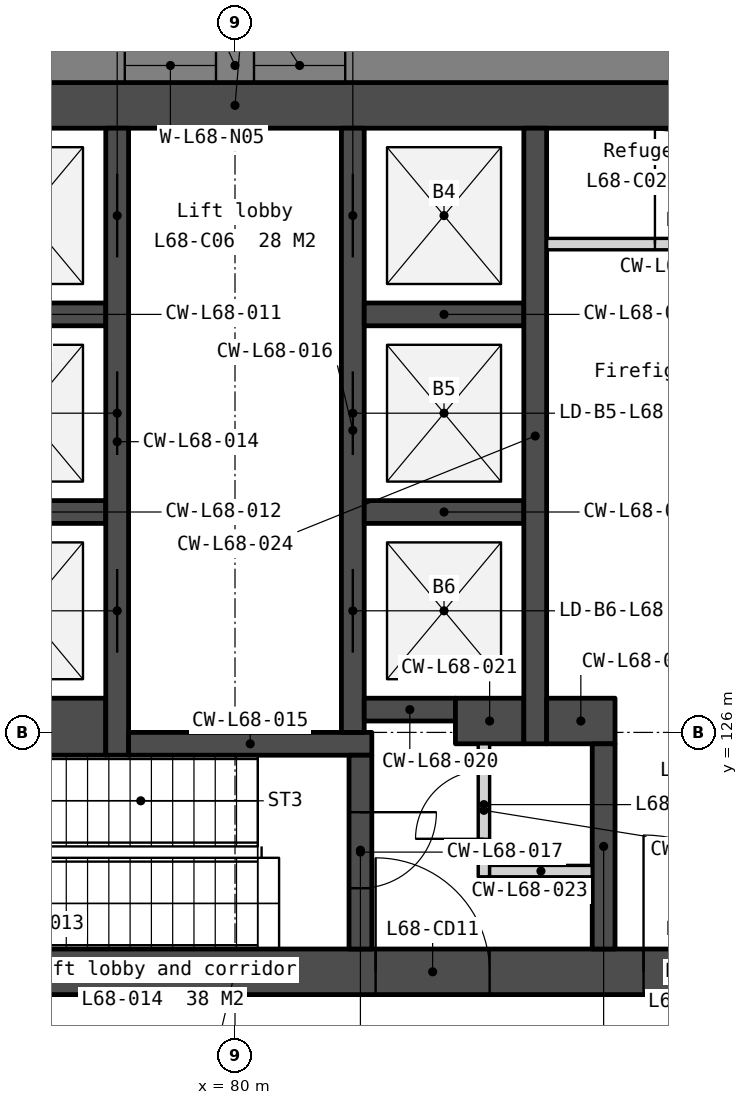
"""IFC4 building model, lengths in metres.
Left out: names, types, materials, properties, quantities, classifications, styles, units other than length and angle.
Written with IfcOpenShell. Run it as: python <this file> out.ifc"""

import sys

from ifc_helpers import new_model, si_unit, direction, frame, frame_2d, origin, place, context, subcontext, project, spatial, polyline, rectangle, outline, extrude, element, fill, save


model = new_model("IFC4")
c1 = context("Model", 3, precision=1e-05, world=origin(), true_north=direction((0.0, 1.0)))
c2 = subcontext(c1, "Body", "Model", "MODEL_VIEW")
j1 = project(units=[si_unit("LENGTHUNIT", "METRE"), si_unit("PLANEANGLEUNIT", "RADIAN")], contexts=[c1])
p1 = place(None, origin())
s1 = spatial("IfcSite", under=j1, at=p1, CompositionType="ELEMENT")
p2 = place(p1, origin())
s2 = spatial("IfcBuilding", under=s1, at=p2, CompositionType="ELEMENT")
p3 = place(p2, frame((0.0, 0.0, 277.7)))
s3 = spatial("IfcBuildingStorey", under=s2, at=p3, CompositionType="ELEMENT", Elevation=277.7)
p4 = place(p3, frame((69.0, 134.25, 0.0), z_axis=(0.0, 0.0, 1.0), x_axis=(1.0, 0.0, 0.0)))
e1 = element("IfcWall", 1, at=p4, inside=s3, PredefinedType="SOLIDWALL", context=c2, shape_type="SweptSolid", body=[
    extrude(rectangle(XDim=22.0, YDim=0.6, at=frame_2d((11.0, 0.0))), origin(), (0.0, 0.0, 1.0), 3.75),
])
p5 = place(p3, frame((69.0, 122.85, 0.0), z_axis=(0.0, 0.0, 1.0), x_axis=(1.0, 0.0, 0.0)))
e2 = element("IfcWall", 2, at=p5, inside=s3, PredefinedType="SOLIDWALL", context=c2, shape_type="SweptSolid", body=[
    extrude(rectangle(XDim=22.0, YDim=0.6, at=frame_2d((11.0, 0.0))), origin(), (0.0, 0.0, 1.0), 3.75),
])
p6 = place(p5, frame((16.375, 0.0, 0.0)))
e3 = element("IfcOpeningElement", 3, at=p6, cuts=e2, PredefinedType="OPENING", context=c2, shape_type="SweptSolid", body=[
    extrude(rectangle(XDim=1.8, YDim=2.1, at=frame_2d((0.9, 1.05))), frame((0.0, 0.31, 0.0), z_axis=(0.0, -1.0, 0.0), x_axis=(1.0, 0.0, 0.0)), (0.0, 0.0, 1.0), 0.62),
])
p7 = place(p5, frame((3.825, 0.0, 0.0)))
e4 = element("IfcOpeningElement", 4, at=p7, cuts=e2, PredefinedType="OPENING", context=c2, shape_type="SweptSolid", body=[
    extrude(rectangle(XDim=1.8, YDim=2.1, at=frame_2d((0.9, 1.05))), frame((0.0, 0.31, 0.0), z_axis=(0.0, -1.0, 0.0), x_axis=(1.0, 0.0, 0.0)), (0.0, 0.0, 1.0), 0.62),
])
p8 = place(p5, frame((12.85, 0.0, 0.0)))
e5 = element("IfcOpeningElement", 5, at=p8, cuts=e2, PredefinedType="OPENING", context=c2, shape_type="SweptSolid", body=[
    extrude(rectangle(XDim=1.5, YDim=2.1, at=frame_2d((0.75, 1.05))), frame((0.0, 0.31, 0.0), z_axis=(0.0, -1.0, 0.0), x_axis=(1.0, 0.0, 0.0)), (0.0, 0.0, 1.0), 0.62),
])
for number, where, z_axis, x_axis in (
    (6, (76.2, 131.5, 0.0), (0.0, 0.0, 1.0), (1.0, 0.0, 0.0)),
    (7, (76.2, 128.9, 0.0), (0.0, 0.0, 1.0), (1.0, 0.0, 0.0)),
):
    element("IfcWall", number, at=place(p3, frame(where, z_axis=z_axis, x_axis=x_axis)), inside=s3, PredefinedType="SOLIDWALL", context=c2, shape_type="SweptSolid", body=[
        extrude(rectangle(XDim=2.1, YDim=0.3, at=frame_2d((1.05, 0.0))), origin(), (0.0, 0.0, 1.0), 3.75),
    ])
p9 = place(p3, frame((76.2, 126.075, 0.0), z_axis=(0.0, 0.0, 1.0), x_axis=(1.0, 0.0, 0.0)))
e8 = element("IfcWall", 8, at=p9, inside=s3, PredefinedType="SOLIDWALL", context=c2, shape_type="SweptSolid", body=[
    extrude(rectangle(XDim=2.1, YDim=0.75, at=frame_2d((1.05, 0.0))), origin(), (0.0, 0.0, 1.0), 3.75),
])
p10 = place(p3, frame((78.45, 133.95, 0.0), z_axis=(0.0, 0.0, 1.0), x_axis=(0.0, -1.0, 0.0)))
e9 = element("IfcWall", 9, at=p10, inside=s3, PredefinedType="SOLIDWALL", context=c2, shape_type="SweptSolid", body=[
    extrude(rectangle(XDim=8.25, YDim=0.3, at=frame_2d((4.125, 0.0))), origin(), (0.0, 0.0, 1.0), 3.75),
])
p11 = place(p10, frame((0.6, 0.0, 0.0)))
e10 = element("IfcOpeningElement", 10, at=p11, cuts=e9, PredefinedType="OPENING", context=c2, shape_type="SweptSolid", body=[
    extrude(rectangle(XDim=1.1, YDim=2.1, at=frame_2d((0.55, 1.05))), frame((0.0, 0.16, 0.0), z_axis=(0.0, -1.0, 0.0), x_axis=(1.0, 0.0, 0.0)), (0.0, 0.0, 1.0), 0.32),
])
p12 = place(p10, frame((3.2, 0.0, 0.0)))
e11 = element("IfcOpeningElement", 11, at=p12, cuts=e9, PredefinedType="OPENING", context=c2, shape_type="SweptSolid", body=[
    extrude(rectangle(XDim=1.1, YDim=2.1, at=frame_2d((0.55, 1.05))), frame((0.0, 0.16, 0.0), z_axis=(0.0, -1.0, 0.0), x_axis=(1.0, 0.0, 0.0)), (0.0, 0.0, 1.0), 0.32),
])
p13 = place(p10, frame((5.8, 0.0, 0.0)))
e12 = element("IfcOpeningElement", 12, at=p13, cuts=e9, PredefinedType="OPENING", context=c2, shape_type="SweptSolid", body=[
    extrude(rectangle(XDim=1.1, YDim=2.1, at=frame_2d((0.55, 1.05))), frame((0.0, 0.16, 0.0), z_axis=(0.0, -1.0, 0.0), x_axis=(1.0, 0.0, 0.0)), (0.0, 0.0, 1.0), 0.32),
])
p14 = place(p3, frame((78.6, 125.85, 0.0), z_axis=(0.0, 0.0, 1.0), x_axis=(1.0, 0.0, 0.0)))
e13 = element("IfcWall", 13, at=p14, inside=s3, PredefinedType="SOLIDWALL", context=c2, shape_type="SweptSolid", body=[
    extrude(rectangle(XDim=3.2, YDim=0.3, at=frame_2d((1.6, 0.0))), origin(), (0.0, 0.0, 1.0), 3.75),
])
p15 = place(p3, frame((81.55, 133.95, 0.0), z_axis=(0.0, 0.0, 1.0), x_axis=(0.0, -1.0, 0.0)))
e14 = element("IfcWall", 14, at=p15, inside=s3, PredefinedType="SOLIDWALL", context=c2, shape_type="SweptSolid", body=[
    extrude(rectangle(XDim=7.95, YDim=0.3, at=frame_2d((3.975, 0.0))), origin(), (0.0, 0.0, 1.0), 3.75),
])
p16 = place(p15, frame((0.6, 0.0, 0.0)))
e15 = element("IfcOpeningElement", 15, at=p16, cuts=e14, PredefinedType="OPENING", context=c2, shape_type="SweptSolid", body=[
    extrude(rectangle(XDim=1.1, YDim=2.1, at=frame_2d((0.55, 1.05))), frame((0.0, 0.16, 0.0), z_axis=(0.0, -1.0, 0.0), x_axis=(1.0, 0.0, 0.0)), (0.0, 0.0, 1.0), 0.32),
])
p17 = place(p15, frame((3.2, 0.0, 0.0)))
e16 = element("IfcOpeningElement", 16, at=p17, cuts=e14, PredefinedType="OPENING", context=c2, shape_type="SweptSolid", body=[
    extrude(rectangle(XDim=1.1, YDim=2.1, at=frame_2d((0.55, 1.05))), frame((0.0, 0.16, 0.0), z_axis=(0.0, -1.0, 0.0), x_axis=(1.0, 0.0, 0.0)), (0.0, 0.0, 1.0), 0.32),
])
p18 = place(p15, frame((5.8, 0.0, 0.0)))
e17 = element("IfcOpeningElement", 17, at=p18, cuts=e14, PredefinedType="OPENING", context=c2, shape_type="SweptSolid", body=[
    extrude(rectangle(XDim=1.1, YDim=2.1, at=frame_2d((0.55, 1.05))), frame((0.0, 0.16, 0.0), z_axis=(0.0, -1.0, 0.0), x_axis=(1.0, 0.0, 0.0)), (0.0, 0.0, 1.0), 0.32),
])
p19 = place(p3, frame((81.65, 125.7, 0.0), z_axis=(0.0, 0.0, 1.0), x_axis=(0.0, -1.0, 0.0)))
e18 = element("IfcWall", 18, at=p19, inside=s3, PredefinedType="SOLIDWALL", context=c2, shape_type="SweptSolid", body=[
    extrude(rectangle(XDim=2.55, YDim=0.3, at=frame_2d((1.275, 0.0))), origin(), (0.0, 0.0, 1.0), 3.75),
])
p20 = place(p19, frame((0.75, 0.0, 0.0)))
e19 = element("IfcOpeningElement", 19, at=p20, cuts=e18, PredefinedType="OPENING", context=c2, shape_type="SweptSolid", body=[
    extrude(rectangle(XDim=1.0, YDim=2.1, at=frame_2d((0.5, 1.05))), frame((0.0, 0.16, 0.0), z_axis=(0.0, -1.0, 0.0), x_axis=(1.0, 0.0, 0.0)), (0.0, 0.0, 1.0), 0.32),
])
for number, where, z_axis, x_axis in (
    (20, (81.7, 131.5, 0.0), (0.0, 0.0, 1.0), (1.0, 0.0, 0.0)),
    (21, (81.7, 128.9, 0.0), (0.0, 0.0, 1.0), (1.0, 0.0, 0.0)),
):
    element("IfcWall", number, at=place(p3, frame(where, z_axis=z_axis, x_axis=x_axis)), inside=s3, PredefinedType="SOLIDWALL", context=c2, shape_type="SweptSolid", body=[
        extrude(rectangle(XDim=2.1, YDim=0.3, at=frame_2d((1.05, 0.0))), origin(), (0.0, 0.0, 1.0), 3.75),
    ])
p21 = place(p3, frame((81.7, 126.3, 0.0), z_axis=(0.0, 0.0, 1.0), x_axis=(1.0, 0.0, 0.0)))
e22 = element("IfcWall", 22, at=p21, inside=s3, PredefinedType="SOLIDWALL", context=c2, shape_type="SweptSolid", body=[
    extrude(rectangle(XDim=1.2, YDim=0.3, at=frame_2d((0.6, 0.0))), origin(), (0.0, 0.0, 1.0), 3.75),
])
p22 = place(p3, frame((82.9, 126.15, 0.0), z_axis=(0.0, 0.0, 1.0), x_axis=(1.0, 0.0, 0.0)))
e23 = element("IfcWall", 23, at=p22, inside=s3, PredefinedType="SOLIDWALL", context=c2, shape_type="SweptSolid", body=[
    extrude(rectangle(XDim=0.9, YDim=0.6, at=frame_2d((0.45, 0.0))), origin(), (0.0, 0.0, 1.0), 3.75),
])
p23 = place(p3, frame((83.275, 125.85, 0.0), z_axis=(0.0, 0.0, 1.0), x_axis=(0.0, -1.0, 0.0)))
e24 = element("IfcWall", 24, at=p23, inside=s3, PredefinedType="PARTITIONING", context=c2, shape_type="SweptSolid", body=[
    extrude(rectangle(XDim=1.75, YDim=0.15, at=frame_2d((0.875, 0.0))), origin(), (0.0, 0.0, 1.0), 3.75),
])
p24 = place(p23, frame((0.35, 0.0, 0.0)))
e25 = element("IfcOpeningElement", 25, at=p24, cuts=e24, PredefinedType="OPENING", context=c2, shape_type="SweptSolid", body=[
    extrude(rectangle(XDim=0.9, YDim=2.1, at=frame_2d((0.45, 1.05))), frame((0.0, 0.085, 0.0), z_axis=(0.0, -1.0, 0.0), x_axis=(1.0, 0.0, 0.0)), (0.0, 0.0, 1.0), 0.17),
])
p25 = place(p3, frame((83.35, 124.175, 0.0), z_axis=(0.0, 0.0, 1.0), x_axis=(1.0, 0.0, 0.0)))
e26 = element("IfcWall", 26, at=p25, inside=s3, PredefinedType="PARTITIONING", context=c2, shape_type="SweptSolid", body=[
    extrude(rectangle(XDim=1.35, YDim=0.15, at=frame_2d((0.675, 0.0))), origin(), (0.0, 0.0, 1.0), 3.75),
])
p26 = place(p3, frame((83.95, 133.95, 0.0), z_axis=(0.0, 0.0, 1.0), x_axis=(0.0, -1.0, 0.0)))
e27 = element("IfcWall", 27, at=p26, inside=s3, PredefinedType="SOLIDWALL", context=c2, shape_type="SweptSolid", body=[
    extrude(rectangle(XDim=8.1, YDim=0.3, at=frame_2d((4.05, 0.0))), origin(), (0.0, 0.0, 1.0), 3.75),
])
p27 = place(p3, frame((84.1, 132.425, 0.0), z_axis=(0.0, 0.0, 1.0), x_axis=(1.0, 0.0, 0.0)))
e28 = element("IfcWall", 28, at=p27, inside=s3, PredefinedType="PARTITIONING", context=c2, shape_type="SweptSolid", body=[
    extrude(rectangle(XDim=3.45, YDim=0.15, at=frame_2d((1.725, 0.0))), origin(), (0.0, 0.0, 1.0), 3.75),
])
p28 = place(p27, frame((1.425, 0.0, 0.0)))
e29 = element("IfcOpeningElement", 29, at=p28, cuts=e28, PredefinedType="OPENING", context=c2, shape_type="SweptSolid", body=[
    extrude(rectangle(XDim=1.5, YDim=2.1, at=frame_2d((0.75, 1.05))), frame((0.0, 0.085, 0.0), z_axis=(0.0, -1.0, 0.0), x_axis=(1.0, 0.0, 0.0)), (0.0, 0.0, 1.0), 0.17),
])
p29 = place(p3, frame((84.1, 126.15, 0.0), z_axis=(0.0, 0.0, 1.0), x_axis=(1.0, 0.0, 0.0)))
e30 = element("IfcWall", 30, at=p29, inside=s3, PredefinedType="SOLIDWALL", context=c2, shape_type="SweptSolid", body=[
    extrude(rectangle(XDim=0.9, YDim=0.6, at=frame_2d((0.45, 0.0))), origin(), (0.0, 0.0, 1.0), 3.75),
])
p30 = place(p3, frame((84.85, 125.85, 0.0), z_axis=(0.0, 0.0, 1.0), x_axis=(0.0, -1.0, 0.0)))
e31 = element("IfcWall", 31, at=p30, inside=s3, PredefinedType="SOLIDWALL", context=c2, shape_type="SweptSolid", body=[
    extrude(rectangle(XDim=2.7, YDim=0.3, at=frame_2d((1.35, 0.0))), origin(), (0.0, 0.0, 1.0), 3.75),
])
p31 = place(p3, frame((98.486, 134.775, -0.15), z_axis=(0.0, 0.0, 1.0), x_axis=(-1.0, 0.0, 0.0)))
e32 = element("IfcWall", 32, at=p31, inside=s3, PredefinedType="SOLIDWALL", context=c2, shape_type="SweptSolid", body=[
    extrude(outline(polyline([(36.972, 0.0), (36.972, 3.9), (0.0, 3.9), (0.0, 0.0), (36.972, 0.0)])), frame((0.0, 0.225, 0.0), z_axis=(0.0, -1.0, 0.0), x_axis=(1.0, 0.0, 0.0)), (0.0, 0.0, 1.0), 0.45),
])
p32 = place(p31, frame((0.744, 0.0, 0.95)))
e33 = element("IfcOpeningElement", 33, at=p32, cuts=e32, PredefinedType="OPENING", context=c2, shape_type="SweptSolid", body=[
    extrude(rectangle(XDim=1.2, YDim=2.2, at=frame_2d((0.6, 1.1))), frame((0.0, 0.235, 0.0), z_axis=(0.0, -1.0, 0.0), x_axis=(1.0, 0.0, 0.0)), (0.0, 0.0, 1.0), 0.47),
])
p33 = place(p31, frame((7.793, 0.0, 0.95)))
e34 = element("IfcOpeningElement", 34, at=p33, cuts=e32, PredefinedType="OPENING", context=c2, shape_type="SweptSolid", body=[
    extrude(rectangle(XDim=1.2, YDim=2.2, at=frame_2d((0.6, 1.1))), frame((0.0, 0.235, 0.0), z_axis=(0.0, -1.0, 0.0), x_axis=(1.0, 0.0, 0.0)), (0.0, 0.0, 1.0), 0.47),
])
p34 = place(p31, frame((9.493, 0.0, 0.95)))
e35 = element("IfcOpeningElement", 35, at=p34, cuts=e32, PredefinedType="OPENING", context=c2, shape_type="SweptSolid", body=[
    extrude(rectangle(XDim=1.2, YDim=2.2, at=frame_2d((0.6, 1.1))), frame((0.0, 0.235, 0.0), z_axis=(0.0, -1.0, 0.0), x_axis=(1.0, 0.0, 0.0)), (0.0, 0.0, 1.0), 0.47),
])
p35 = place(p31, frame((17.036, 0.0, 0.95)))
e36 = element("IfcOpeningElement", 36, at=p35, cuts=e32, PredefinedType="OPENING", context=c2, shape_type="SweptSolid", body=[
    extrude(rectangle(XDim=1.2, YDim=2.2, at=frame_2d((0.6, 1.1))), frame((0.0, 0.235, 0.0), z_axis=(0.0, -1.0, 0.0), x_axis=(1.0, 0.0, 0.0)), (0.0, 0.0, 1.0), 0.47),
])
p36 = place(p31, frame((18.736, 0.0, 0.95)))
e37 = element("IfcOpeningElement", 37, at=p36, cuts=e32, PredefinedType="OPENING", context=c2, shape_type="SweptSolid", body=[
    extrude(rectangle(XDim=1.2, YDim=2.2, at=frame_2d((0.6, 1.1))), frame((0.0, 0.235, 0.0), z_axis=(0.0, -1.0, 0.0), x_axis=(1.0, 0.0, 0.0)), (0.0, 0.0, 1.0), 0.47),
])
p37 = place(p31, frame((26.279, 0.0, 0.95)))
e38 = element("IfcOpeningElement", 38, at=p37, cuts=e32, PredefinedType="OPENING", context=c2, shape_type="SweptSolid", body=[
    extrude(rectangle(XDim=1.2, YDim=2.2, at=frame_2d((0.6, 1.1))), frame((0.0, 0.235, 0.0), z_axis=(0.0, -1.0, 0.0), x_axis=(1.0, 0.0, 0.0)), (0.0, 0.0, 1.0), 0.47),
])
p38 = place(p31, frame((27.979, 0.0, 0.95)))
e39 = element("IfcOpeningElement", 39, at=p38, cuts=e32, PredefinedType="OPENING", context=c2, shape_type="SweptSolid", body=[
    extrude(rectangle(XDim=1.2, YDim=2.2, at=frame_2d((0.6, 1.1))), frame((0.0, 0.235, 0.0), z_axis=(0.0, -1.0, 0.0), x_axis=(1.0, 0.0, 0.0)), (0.0, 0.0, 1.0), 0.47),
])
p39 = place(p31, frame((35.028, 0.0, 0.95)))
e40 = element("IfcOpeningElement", 40, at=p39, cuts=e32, PredefinedType="OPENING", context=c2, shape_type="SweptSolid", body=[
    extrude(rectangle(XDim=1.2, YDim=2.2, at=frame_2d((0.6, 1.1))), frame((0.0, 0.235, 0.0), z_axis=(0.0, -1.0, 0.0), x_axis=(1.0, 0.0, 0.0)), (0.0, 0.0, 1.0), 0.47),
])
p40 = place(p3, frame((60.609, 133.207, -0.15), z_axis=(0.0, 0.0, 1.0), x_axis=(0.500002536638, -0.866023939251, 0.0)))
e41 = element("IfcWall", 41, at=p40, inside=s3, PredefinedType="SOLIDWALL", context=c2, shape_type="SweptSolid", body=[
    extrude(outline(polyline([(36.972, 0.0), (36.972, 3.9), (0.0, 3.9), (0.0, 0.0), (36.972, 0.0)])), frame((0.0, 0.225, 0.0), z_axis=(0.0, -1.0, 0.0), x_axis=(1.0, 0.0, 0.0)), (0.0, 0.0, 1.0), 0.45),
])
p41 = place(p40, frame((0.744, 0.0, 0.95)))
e42 = element("IfcOpeningElement", 42, at=p41, cuts=e41, PredefinedType="OPENING", context=c2, shape_type="SweptSolid", body=[
    extrude(rectangle(XDim=1.2, YDim=2.2, at=frame_2d((0.6, 1.1))), frame((0.0, 0.235, 0.0), z_axis=(0.0, -1.0, 0.0), x_axis=(1.0, 0.0, 0.0)), (0.0, 0.0, 1.0), 0.47),
])
p42 = place(p40, frame((7.793, 0.0, 0.95)))
e43 = element("IfcOpeningElement", 43, at=p42, cuts=e41, PredefinedType="OPENING", context=c2, shape_type="SweptSolid", body=[
    extrude(rectangle(XDim=1.2, YDim=2.2, at=frame_2d((0.6, 1.1))), frame((0.0, 0.235, 0.0), z_axis=(0.0, -1.0, 0.0), x_axis=(1.0, 0.0, 0.0)), (0.0, 0.0, 1.0), 0.47),
])
p43 = place(p40, frame((9.493, 0.0, 0.95)))
e44 = element("IfcOpeningElement", 44, at=p43, cuts=e41, PredefinedType="OPENING", context=c2, shape_type="SweptSolid", body=[
    extrude(rectangle(XDim=1.2, YDim=2.2, at=frame_2d((0.6, 1.1))), frame((0.0, 0.235, 0.0), z_axis=(0.0, -1.0, 0.0), x_axis=(1.0, 0.0, 0.0)), (0.0, 0.0, 1.0), 0.47),
])
p44 = place(p40, frame((17.036, 0.0, 0.95)))
e45 = element("IfcOpeningElement", 45, at=p44, cuts=e41, PredefinedType="OPENING", context=c2, shape_type="SweptSolid", body=[
    extrude(rectangle(XDim=1.2, YDim=2.2, at=frame_2d((0.6, 1.1))), frame((0.0, 0.235, 0.0), z_axis=(0.0, -1.0, 0.0), x_axis=(1.0, 0.0, 0.0)), (0.0, 0.0, 1.0), 0.47),
])
p45 = place(p40, frame((18.736, 0.0, 0.95)))
e46 = element("IfcOpeningElement", 46, at=p45, cuts=e41, PredefinedType="OPENING", context=c2, shape_type="SweptSolid", body=[
    extrude(rectangle(XDim=1.2, YDim=2.2, at=frame_2d((0.6, 1.1))), frame((0.0, 0.235, 0.0), z_axis=(0.0, -1.0, 0.0), x_axis=(1.0, 0.0, 0.0)), (0.0, 0.0, 1.0), 0.47),
])
p46 = place(p40, frame((26.279, 0.0, 0.95)))
e47 = element("IfcOpeningElement", 47, at=p46, cuts=e41, PredefinedType="OPENING", context=c2, shape_type="SweptSolid", body=[
    extrude(rectangle(XDim=1.2, YDim=2.2, at=frame_2d((0.6, 1.1))), frame((0.0, 0.235, 0.0), z_axis=(0.0, -1.0, 0.0), x_axis=(1.0, 0.0, 0.0)), (0.0, 0.0, 1.0), 0.47),
])
p47 = place(p40, frame((27.979, 0.0, 0.95)))
e48 = element("IfcOpeningElement", 48, at=p47, cuts=e41, PredefinedType="OPENING", context=c2, shape_type="SweptSolid", body=[
    extrude(rectangle(XDim=1.2, YDim=2.2, at=frame_2d((0.6, 1.1))), frame((0.0, 0.235, 0.0), z_axis=(0.0, -1.0, 0.0), x_axis=(1.0, 0.0, 0.0)), (0.0, 0.0, 1.0), 0.47),
])
p48 = place(p40, frame((35.028, 0.0, 0.95)))
e49 = element("IfcOpeningElement", 49, at=p48, cuts=e41, PredefinedType="OPENING", context=c2, shape_type="SweptSolid", body=[
    extrude(rectangle(XDim=1.2, YDim=2.2, at=frame_2d((0.6, 1.1))), frame((0.0, 0.235, 0.0), z_axis=(0.0, -1.0, 0.0), x_axis=(1.0, 0.0, 0.0)), (0.0, 0.0, 1.0), 0.47),
])
p49 = place(p11, origin())
e50 = element("IfcDoor", 50, at=p49, inside=s3, OperationType="SLIDING_TO_RIGHT", PredefinedType="DOOR", context=c2, shape_type="SweptSolid", body=[
    extrude(rectangle(XDim=1.1, YDim=2.1, at=frame_2d((0.55, 1.05))), frame((0.0, 0.025, 0.0), z_axis=(0.0, -1.0, 0.0), x_axis=(1.0, 0.0, 0.0)), (0.0, 0.0, 1.0), 0.05),
])
fill(e10, e50)
p50 = place(p12, origin())
e51 = element("IfcDoor", 51, at=p50, inside=s3, OperationType="SLIDING_TO_RIGHT", PredefinedType="DOOR", context=c2, shape_type="SweptSolid", body=[
    extrude(rectangle(XDim=1.1, YDim=2.1, at=frame_2d((0.55, 1.05))), frame((0.0, 0.025, 0.0), z_axis=(0.0, -1.0, 0.0), x_axis=(1.0, 0.0, 0.0)), (0.0, 0.0, 1.0), 0.05),
])
fill(e11, e51)
p51 = place(p13, origin())
e52 = element("IfcDoor", 52, at=p51, inside=s3, OperationType="SLIDING_TO_RIGHT", PredefinedType="DOOR", context=c2, shape_type="SweptSolid", body=[
    extrude(rectangle(XDim=1.1, YDim=2.1, at=frame_2d((0.55, 1.05))), frame((0.0, 0.025, 0.0), z_axis=(0.0, -1.0, 0.0), x_axis=(1.0, 0.0, 0.0)), (0.0, 0.0, 1.0), 0.05),
])
fill(e12, e52)
p52 = place(p16, origin())
e53 = element("IfcDoor", 53, at=p52, inside=s3, OperationType="SLIDING_TO_LEFT", PredefinedType="DOOR", context=c2, shape_type="SweptSolid", body=[
    extrude(rectangle(XDim=1.1, YDim=2.1, at=frame_2d((0.55, 1.05))), frame((0.0, 0.025, 0.0), z_axis=(0.0, -1.0, 0.0), x_axis=(1.0, 0.0, 0.0)), (0.0, 0.0, 1.0), 0.05),
])
fill(e15, e53)
p53 = place(p17, origin())
e54 = element("IfcDoor", 54, at=p53, inside=s3, OperationType="SLIDING_TO_LEFT", PredefinedType="DOOR", context=c2, shape_type="SweptSolid", body=[
    extrude(rectangle(XDim=1.1, YDim=2.1, at=frame_2d((0.55, 1.05))), frame((0.0, 0.025, 0.0), z_axis=(0.0, -1.0, 0.0), x_axis=(1.0, 0.0, 0.0)), (0.0, 0.0, 1.0), 0.05),
])
fill(e16, e54)
p54 = place(p18, origin())
e55 = element("IfcDoor", 55, at=p54, inside=s3, OperationType="SLIDING_TO_LEFT", PredefinedType="DOOR", context=c2, shape_type="SweptSolid", body=[
    extrude(rectangle(XDim=1.1, YDim=2.1, at=frame_2d((0.55, 1.05))), frame((0.0, 0.025, 0.0), z_axis=(0.0, -1.0, 0.0), x_axis=(1.0, 0.0, 0.0)), (0.0, 0.0, 1.0), 0.05),
])
fill(e17, e55)
p55 = place(p6, origin())
e56 = element("IfcDoor", 56, at=p55, inside=s3, OperationType="DOUBLE_DOOR_DOUBLE_SWING", PredefinedType="DOOR", context=c2, shape_type="SweptSolid", body=[
    extrude(rectangle(XDim=1.8, YDim=2.1, at=frame_2d((0.9, 1.05))), frame((0.0, 0.025, 0.0), z_axis=(0.0, -1.0, 0.0), x_axis=(1.0, 0.0, 0.0)), (0.0, 0.0, 1.0), 0.05),
])
fill(e3, e56)
p56 = place(p8, origin())
e57 = element("IfcDoor", 57, at=p56, inside=s3, OperationType="DOUBLE_DOOR_DOUBLE_SWING", PredefinedType="DOOR", context=c2, shape_type="SweptSolid", body=[
    extrude(rectangle(XDim=1.5, YDim=2.1, at=frame_2d((0.75, 1.05))), frame((0.0, 0.025, 0.0), z_axis=(0.0, -1.0, 0.0), x_axis=(1.0, 0.0, 0.0)), (0.0, 0.0, 1.0), 0.05),
])
fill(e5, e57)
p57 = place(p24, origin())
e58 = element("IfcDoor", 58, at=p57, inside=s3, OperationType="SINGLE_SWING_RIGHT", PredefinedType="DOOR", context=c2, shape_type="SweptSolid", body=[
    extrude(rectangle(XDim=0.9, YDim=2.1, at=frame_2d((0.45, 1.05))), frame((0.0, 0.025, 0.0), z_axis=(0.0, -1.0, 0.0), x_axis=(1.0, 0.0, 0.0)), (0.0, 0.0, 1.0), 0.05),
])
fill(e25, e58)
p58 = place(p28, origin())
e59 = element("IfcDoor", 59, at=p58, inside=s3, OperationType="DOUBLE_DOOR_DOUBLE_SWING", PredefinedType="DOOR", context=c2, shape_type="SweptSolid", body=[
    extrude(rectangle(XDim=1.5, YDim=2.1, at=frame_2d((0.75, 1.05))), frame((0.0, 0.025, 0.0), z_axis=(0.0, -1.0, 0.0), x_axis=(1.0, 0.0, 0.0)), (0.0, 0.0, 1.0), 0.05),
])
fill(e29, e59)
p59 = place(p20, origin())
e60 = element("IfcDoor", 60, at=p59, inside=s3, OperationType="SINGLE_SWING_LEFT", PredefinedType="DOOR", context=c2, shape_type="SweptSolid", body=[
    extrude(rectangle(XDim=1.0, YDim=2.1, at=frame_2d((0.5, 1.05))), frame((0.0, 0.025, 0.0), z_axis=(0.0, -1.0, 0.0), x_axis=(1.0, 0.0, 0.0)), (0.0, 0.0, 1.0), 0.05),
])
fill(e19, e60)
p60 = place(p35, origin())
e61 = element("IfcWindow", 61, at=p60, inside=s3, PartitioningType="SINGLE_PANEL", PredefinedType="WINDOW", context=c2, shape_type="SweptSolid", body=[
    extrude(rectangle(XDim=1.2, YDim=2.2, at=frame_2d((0.6, 1.1))), frame((0.0, 0.03, 0.0), z_axis=(0.0, -1.0, 0.0), x_axis=(1.0, 0.0, 0.0)), (0.0, 0.0, 1.0), 0.06),
])
fill(e36, e61)
p61 = place(p36, origin())
e62 = element("IfcWindow", 62, at=p61, inside=s3, PartitioningType="SINGLE_PANEL", PredefinedType="WINDOW", context=c2, shape_type="SweptSolid", body=[
    extrude(rectangle(XDim=1.2, YDim=2.2, at=frame_2d((0.6, 1.1))), frame((0.0, 0.03, 0.0), z_axis=(0.0, -1.0, 0.0), x_axis=(1.0, 0.0, 0.0)), (0.0, 0.0, 1.0), 0.06),
])
fill(e37, e62)
save(model, sys.argv[1])
